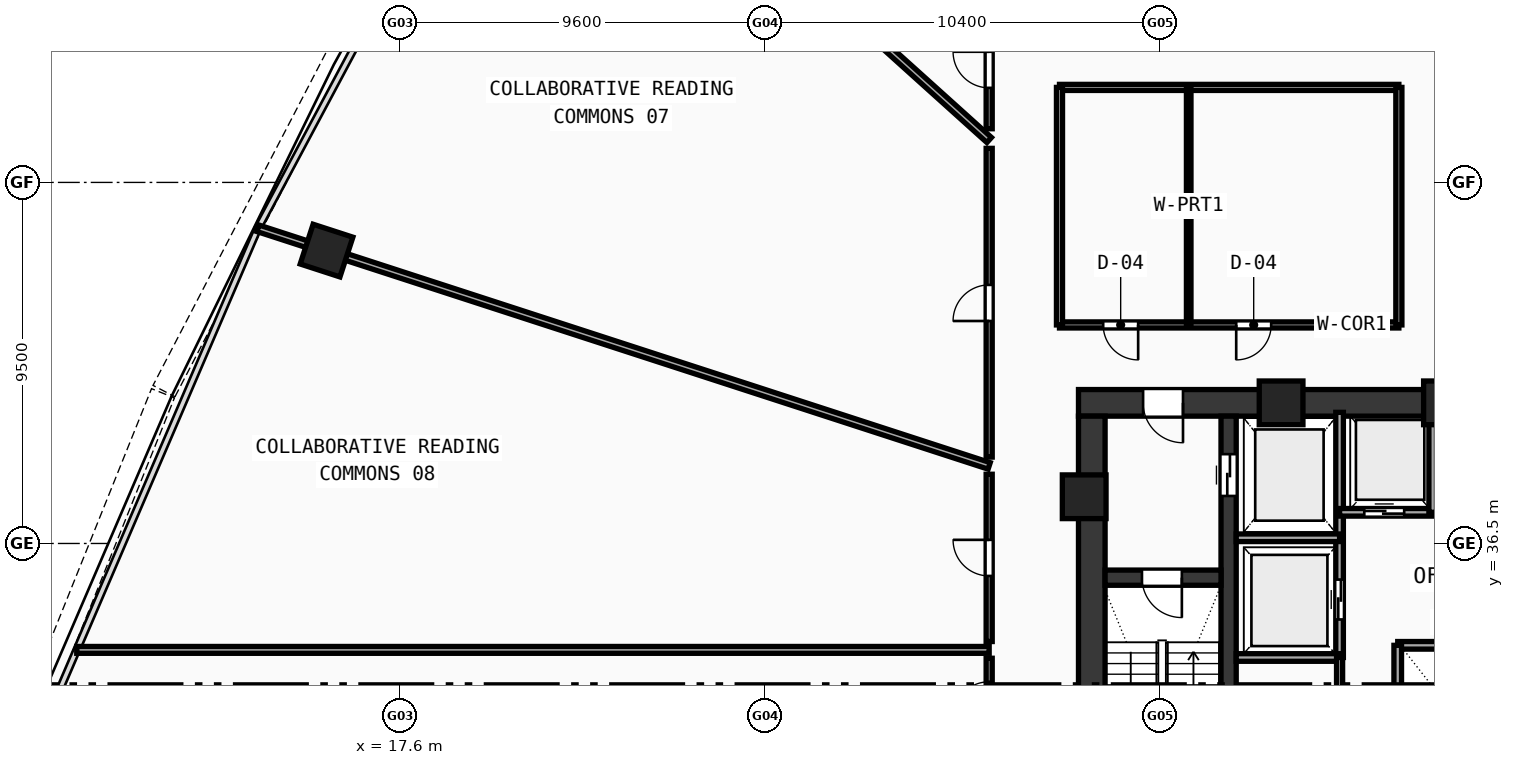
"""IFC4 building model, lengths in metres.
Left out: names, types, materials, properties, quantities, classifications, styles, units other than length and angle.
Written with IfcOpenShell. Run it as: python <this file> out.ifc"""

import sys

from ifc_helpers import new_model, si_unit, direction, frame, frame_2d, origin, origin_with_axes, origin_2d, place, context, subcontext, project, spatial, rectangle, hollow_rectangle, extrude, source, transform, mapped, element, fill, save


model = new_model("IFC4")
c1 = context("Model", 3, precision=1e-05, world=origin(), true_north=direction((0.0, 1.0)))
c2 = subcontext(c1, "Body", "Model", "MODEL_VIEW")
j1 = project(units=[si_unit("LENGTHUNIT", "METRE"), si_unit("PLANEANGLEUNIT", "RADIAN")], contexts=[c1])
p1 = place(None, origin())
s1 = spatial("IfcSite", under=j1, at=p1, CompositionType="ELEMENT")
p2 = place(p1, origin())
s2 = spatial("IfcBuilding", under=s1, at=p2, CompositionType="ELEMENT")
p3 = place(p2, frame((0.0, 0.0, 34.03)))
s3 = spatial("IfcBuildingStorey", under=s2, at=p3, CompositionType="ELEMENT", Elevation=34.03)
p4 = place(p3, frame((35.45, 40.2, 0.0), z_axis=(0.0, 0.0, 1.0), x_axis=(1.0, 0.0, 0.0)))
e1 = element("IfcWall", 1, at=p4, inside=s3, PredefinedType="SHEAR", context=c2, shape_type="SweptSolid", body=[
    extrude(rectangle(XDim=11.35, YDim=0.7, at=frame_2d((5.675, 0.0))), origin(), (0.0, 0.0, 1.0), 3.37),
])
p5 = place(p4, frame((1.7, 0.0, 0.0)))
e2 = element("IfcOpeningElement", 2, at=p5, cuts=e1, PredefinedType="OPENING", context=c2, shape_type="SweptSolid", body=[
    extrude(rectangle(XDim=1.05, YDim=2.1, at=frame_2d((0.525, 1.05))), frame((0.0, 0.36, 0.0), z_axis=(0.0, -1.0, 0.0), x_axis=(1.0, 0.0, 0.0)), (0.0, 0.0, 1.0), 0.72),
])
p6 = place(p3, frame((35.8, 27.85, 0.0), z_axis=(0.0, 0.0, 1.0), x_axis=(0.0, 1.0, 0.0)))
e3 = element("IfcWall", 3, at=p6, inside=s3, PredefinedType="SHEAR", context=c2, shape_type="SweptSolid", body=[
    extrude(rectangle(XDim=12.0, YDim=0.7, at=frame_2d((6.0, 0.0))), origin(), (0.0, 0.0, 1.0), 3.37),
])
p7 = place(p3, frame((39.4, 27.85, 0.0), z_axis=(0.0, 0.0, 1.0), x_axis=(0.0, 1.0, 0.0)))
e4 = element("IfcWall", 4, at=p7, inside=s3, PredefinedType="SHEAR", context=c2, shape_type="SweptSolid", body=[
    extrude(rectangle(XDim=12.0, YDim=0.4, at=frame_2d((6.0, 0.0))), origin(), (0.0, 0.0, 1.0), 3.37),
])
p8 = place(p7, frame((9.9, 0.0, 0.0)))
e5 = element("IfcOpeningElement", 5, at=p8, cuts=e4, PredefinedType="OPENING", context=c2, shape_type="SweptSolid", body=[
    extrude(rectangle(XDim=1.1, YDim=2.1, at=frame_2d((0.55, 1.05))), frame((0.0, 0.21, 0.0), z_axis=(0.0, -1.0, 0.0), x_axis=(1.0, 0.0, 0.0)), (0.0, 0.0, 1.0), 0.42),
])
p9 = place(p3, frame((36.15, 35.6, 0.0), z_axis=(0.0, 0.0, 1.0), x_axis=(1.0, 0.0, 0.0)))
e6 = element("IfcWall", 6, at=p9, inside=s3, PredefinedType="SHEAR", context=c2, shape_type="SweptSolid", body=[
    extrude(rectangle(XDim=3.05, YDim=0.4, at=frame_2d((1.525, 0.0))), origin(), (0.0, 0.0, 1.0), 3.37),
])
p10 = place(p9, frame((0.97, 0.0, 0.0)))
e7 = element("IfcOpeningElement", 7, at=p10, cuts=e6, PredefinedType="OPENING", context=c2, shape_type="SweptSolid", body=[
    extrude(rectangle(XDim=1.05, YDim=2.1, at=frame_2d((0.525, 1.05))), frame((0.0, 0.21, 0.0), z_axis=(0.0, -1.0, 0.0), x_axis=(1.0, 0.0, 0.0)), (0.0, 0.0, 1.0), 0.42),
])
m1 = source(origin(), c2, "Body", "SweptSolid", [
    extrude(hollow_rectangle(XDim=1.15, YDim=1.15, WallThickness=0.048, at=origin_2d()), origin(), (0.0, 0.0, 1.0), 3.63),
])
for number, where, z_axis, x_axis in (
    (8, (45.106, 40.2, -0.26), (0.0, 0.0, 1.0), (1.0, 0.0, 0.0)),
    (9, (40.781, 40.2, -0.26), (0.0, 0.0, 1.0), (1.0, 0.0, 0.0)),
    (10, (35.6, 37.729, -0.26), (0.0, 0.0, 1.0), (1.0, 0.0, 0.0)),
):
    element("IfcColumn", number, at=place(p3, frame(where, z_axis=z_axis, x_axis=x_axis)), inside=s3, PredefinedType="COLUMN", context=c2, shape_type="MappedRepresentation", body=[
        mapped(m1, transform((0.0, 0.0, 0.0), scale=1.0)),
    ])
m2 = source(origin(), c2, "Body", "SweptSolid", [
    extrude(hollow_rectangle(XDim=1.1, YDim=1.1, WallThickness=0.045, at=origin_2d()), origin(), (0.0, 0.0, 1.0), 3.63),
])
p11 = place(p3, frame((15.665, 44.206, -0.26), z_axis=(0.0, 0.0, 1.0), x_axis=(-0.309016994375, -0.951056516295, 0.0)))
e11 = element("IfcColumn", 11, at=p11, inside=s3, PredefinedType="COLUMN", context=c2, shape_type="MappedRepresentation", body=[
    mapped(m2, transform((0.0, 0.0, 0.0), scale=1.0)),
])
p12 = place(p3, frame((42.32, 33.5, 0.0), z_axis=(0.0, 0.0, 1.0), x_axis=(0.0, 1.0, 0.0)))
e12 = element("IfcWall", 12, at=p12, inside=s3, PredefinedType="SOLIDWALL", context=c2, shape_type="SweptSolid", body=[
    extrude(rectangle(XDim=6.45, YDim=0.2, at=frame_2d((3.225, 0.0))), origin(), (0.0, 0.0, 1.0), 3.37),
])
p13 = place(p12, frame((1.0, 0.0, 0.0)))
e13 = element("IfcOpeningElement", 13, at=p13, cuts=e12, PredefinedType="OPENING", context=c2, shape_type="SweptSolid", body=[
    extrude(rectangle(XDim=1.05, YDim=2.1, at=frame_2d((0.525, 1.05))), frame((0.0, 0.11, 0.0), z_axis=(0.0, -1.0, 0.0), x_axis=(1.0, 0.0, 0.0)), (0.0, 0.0, 1.0), 0.22),
])
for number, where, z_axis, x_axis in (
    (14, (39.6, 36.65, 0.0), (0.0, 0.0, 1.0), (1.0, 0.0, 0.0)),
    (15, (39.6, 33.5, 0.0), (0.0, 0.0, 1.0), (1.0, 0.0, 0.0)),
):
    element("IfcWall", number, at=place(p3, frame(where, z_axis=z_axis, x_axis=x_axis)), inside=s3, PredefinedType="SOLIDWALL", context=c2, shape_type="SweptSolid", body=[
        extrude(rectangle(XDim=2.72, YDim=0.2, at=frame_2d((1.36, 0.0))), origin(), (0.0, 0.0, 1.0), 3.37),
    ])
p14 = place(p3, frame((42.32, 37.32, 0.0), z_axis=(0.0, 0.0, 1.0), x_axis=(1.0, 0.0, 0.0)))
e16 = element("IfcWall", 16, at=p14, inside=s3, PredefinedType="SOLIDWALL", context=c2, shape_type="SweptSolid", body=[
    extrude(rectangle(XDim=4.73, YDim=0.2, at=frame_2d((2.365, 0.0))), origin(), (0.0, 0.0, 1.0), 3.37),
])
p15 = place(p14, frame((0.65, 0.0, 0.0)))
e17 = element("IfcOpeningElement", 17, at=p15, cuts=e16, PredefinedType="OPENING", context=c2, shape_type="SweptSolid", body=[
    extrude(rectangle(XDim=1.05, YDim=2.1, at=frame_2d((0.525, 1.05))), frame((0.0, 0.11, 0.0), z_axis=(0.0, -1.0, 0.0), x_axis=(1.0, 0.0, 0.0)), (0.0, 0.0, 1.0), 0.22),
])
p16 = place(p14, frame((2.95, 0.0, 0.0)))
e18 = element("IfcOpeningElement", 18, at=p16, cuts=e16, PredefinedType="OPENING", context=c2, shape_type="SweptSolid", body=[
    extrude(rectangle(XDim=1.05, YDim=2.1, at=frame_2d((0.525, 1.05))), frame((0.0, 0.11, 0.0), z_axis=(0.0, -1.0, 0.0), x_axis=(1.0, 0.0, 0.0)), (0.0, 0.0, 1.0), 0.22),
])
p17 = place(p3, frame((44.77, 37.32, 0.0), z_axis=(0.0, 0.0, 1.0), x_axis=(0.0, 1.0, 0.0)))
e19 = element("IfcWall", 19, at=p17, inside=s3, PredefinedType="SOLIDWALL", context=c2, shape_type="SweptSolid", body=[
    extrude(rectangle(XDim=2.63, YDim=0.2, at=frame_2d((1.315, 0.0))), origin(), (0.0, 0.0, 1.0), 3.37),
])
p18 = place(p3, frame((43.85, 33.82, 0.0), z_axis=(0.0, 0.0, 1.0), x_axis=(1.0, 0.0, 0.0)))
e20 = element("IfcWall", 20, at=p18, inside=s3, PredefinedType="SOLIDWALL", context=c2, shape_type="SweptSolid", body=[
    extrude(rectangle(XDim=9.83, YDim=0.2, at=frame_2d((4.915, 0.0))), origin(), (0.0, 0.0, 1.0), 3.37),
])
p19 = place(p3, frame((43.85, 27.6, 0.0), z_axis=(0.0, 0.0, 1.0), x_axis=(0.0, 1.0, 0.0)))
e21 = element("IfcWall", 21, at=p19, inside=s3, PredefinedType="SOLIDWALL", context=c2, shape_type="SweptSolid", body=[
    extrude(rectangle(XDim=6.22, YDim=0.2, at=frame_2d((3.11, 0.0))), origin(), (0.0, 0.0, 1.0), 3.37),
])
p20 = place(p19, frame((2.25, 0.0, 0.0)))
e22 = element("IfcOpeningElement", 22, at=p20, cuts=e21, PredefinedType="OPENING", context=c2, shape_type="SweptSolid", body=[
    extrude(rectangle(XDim=1.05, YDim=2.1, at=frame_2d((0.525, 1.05))), frame((0.0, 0.11, 0.0), z_axis=(0.0, -1.0, 0.0), x_axis=(1.0, 0.0, 0.0)), (0.0, 0.0, 1.0), 0.22),
])
p21 = place(p3, frame((42.32, 27.6, 0.0), z_axis=(0.0, 0.0, 1.0), x_axis=(0.0, 1.0, 0.0)))
e23 = element("IfcWall", 23, at=p21, inside=s3, PredefinedType="PARTITIONING", context=c2, shape_type="SweptSolid", body=[
    extrude(rectangle(XDim=5.9, YDim=0.16, at=frame_2d((2.95, 0.0))), origin(), (0.0, 0.0, 1.0), 3.37),
])
p22 = place(p21, frame((3.2, 0.0, 0.0)))
e24 = element("IfcOpeningElement", 24, at=p22, cuts=e23, PredefinedType="OPENING", context=c2, shape_type="SweptSolid", body=[
    extrude(rectangle(XDim=0.94, YDim=2.1, at=frame_2d((0.47, 1.05))), frame((0.0, 0.09, 0.0), z_axis=(0.0, -1.0, 0.0), x_axis=(1.0, 0.0, 0.0)), (0.0, 0.0, 1.0), 0.18),
])
p23 = place(p3, frame((34.95, 42.25, 0.0), z_axis=(0.0, 0.0, 1.0), x_axis=(1.0, 0.0, 0.0)))
e25 = element("IfcWall", 25, at=p23, inside=s3, PredefinedType="PARTITIONING", context=c2, shape_type="SweptSolid", body=[
    extrude(rectangle(XDim=8.93, YDim=0.16, at=frame_2d((4.465, 0.0))), origin(), (0.0, 0.0, 1.0), 2.67),
])
p24 = place(p23, frame((1.15, 0.0, 0.0)))
e26 = element("IfcOpeningElement", 26, at=p24, cuts=e25, PredefinedType="OPENING", context=c2, shape_type="SweptSolid", body=[
    extrude(rectangle(XDim=0.92, YDim=2.1, at=frame_2d((0.46, 1.05))), frame((0.0, 0.09, 0.0), z_axis=(0.0, -1.0, 0.0), x_axis=(1.0, 0.0, 0.0)), (0.0, 0.0, 1.0), 0.18),
])
p25 = place(p23, frame((4.65, 0.0, 0.0)))
e27 = element("IfcOpeningElement", 27, at=p25, cuts=e25, PredefinedType="OPENING", context=c2, shape_type="SweptSolid", body=[
    extrude(rectangle(XDim=0.92, YDim=2.1, at=frame_2d((0.46, 1.05))), frame((0.0, 0.09, 0.0), z_axis=(0.0, -1.0, 0.0), x_axis=(1.0, 0.0, 0.0)), (0.0, 0.0, 1.0), 0.18),
])
p26 = place(p3, frame((34.95, 48.5, 0.0), z_axis=(0.0, 0.0, 1.0), x_axis=(1.0, 0.0, 0.0)))
e28 = element("IfcWall", 28, at=p26, inside=s3, PredefinedType="PARTITIONING", context=c2, shape_type="SweptSolid", body=[
    extrude(rectangle(XDim=8.93, YDim=0.16, at=frame_2d((4.465, 0.0))), origin(), (0.0, 0.0, 1.0), 2.67),
])
for number, where, z_axis, x_axis in (
    (29, (34.95, 42.25, 0.0), (0.0, 0.0, 1.0), (0.0, 1.0, 0.0)),
    (30, (43.88, 42.25, 0.0), (0.0, 0.0, 1.0), (0.0, 1.0, 0.0)),
):
    element("IfcWall", number, at=place(p3, frame(where, z_axis=z_axis, x_axis=x_axis)), inside=s3, PredefinedType="PARTITIONING", context=c2, shape_type="SweptSolid", body=[
        extrude(rectangle(XDim=6.25, YDim=0.16, at=frame_2d((3.125, 0.0))), origin(), (0.0, 0.0, 1.0), 2.67),
    ])
p27 = place(p3, frame((38.35, 42.25, 0.0), z_axis=(0.0, 0.0, 1.0), x_axis=(0.0, 1.0, 0.0)))
e31 = element("IfcWall", 31, at=p27, inside=s3, PredefinedType="PARTITIONING", context=c2, shape_type="SweptSolid", body=[
    extrude(rectangle(XDim=6.25, YDim=0.12, at=frame_2d((3.125, 0.0))), origin(), (0.0, 0.0, 1.0), 2.67),
])
p28 = place(p3, frame((33.1, 47.116, 0.0), z_axis=(0.0, 0.0, 1.0), x_axis=(-0.74314347906, 0.669132101704, 0.0)))
e32 = element("IfcWall", 32, at=p28, inside=s3, PredefinedType="PARTITIONING", context=c2, shape_type="SweptSolid", body=[
    extrude(rectangle(XDim=16.358, YDim=0.18, at=frame_2d((8.179, 0.0))), origin(), (0.0, 0.0, 1.0), 2.67),
])
p29 = place(p3, frame((33.1, 38.541, 0.0), z_axis=(0.0, 0.0, 1.0), x_axis=(-0.951056237035, 0.309017853848, 0.0)))
e33 = element("IfcWall", 33, at=p29, inside=s3, PredefinedType="PARTITIONING", context=c2, shape_type="SweptSolid", body=[
    extrude(rectangle(XDim=20.231, YDim=0.18, at=frame_2d((10.115, 0.0))), origin(), (0.0, 0.0, 1.0), 2.67),
])
p30 = place(p3, frame((33.1, 33.7, 0.0), z_axis=(0.0, 0.0, 1.0), x_axis=(-1.0, 0.0, 0.0)))
e34 = element("IfcWall", 34, at=p30, inside=s3, PredefinedType="PARTITIONING", context=c2, shape_type="SweptSolid", body=[
    extrude(rectangle(XDim=24.008, YDim=0.18, at=frame_2d((12.004, 0.0))), origin(), (0.0, 0.0, 1.0), 2.67),
])
p31 = place(p3, frame((33.1, 31.292, 0.0), z_axis=(0.0, 0.0, 1.0), x_axis=(0.0, 1.0, 0.0)))
e35 = element("IfcWall", 35, at=p31, inside=s3, PredefinedType="PARTITIONING", context=c2, shape_type="SweptSolid", body=[
    extrude(rectangle(XDim=2.188, YDim=0.16, at=frame_2d((1.094, 0.0))), origin(), (0.0, 0.0, 1.0), 3.37),
])
p32 = place(p31, frame((0.619, 0.0, 0.0)))
e36 = element("IfcOpeningElement", 36, at=p32, cuts=e35, PredefinedType="OPENING", context=c2, shape_type="SweptSolid", body=[
    extrude(rectangle(XDim=0.95, YDim=2.1, at=frame_2d((0.475, 1.05))), frame((0.0, 0.09, 0.0), z_axis=(0.0, -1.0, 0.0), x_axis=(1.0, 0.0, 0.0)), (0.0, 0.0, 1.0), 0.18),
])
p33 = place(p3, frame((33.1, 33.92, 0.0), z_axis=(0.0, 0.0, 1.0), x_axis=(0.0, 1.0, 0.0)))
e37 = element("IfcWall", 37, at=p33, inside=s3, PredefinedType="PARTITIONING", context=c2, shape_type="SweptSolid", body=[
    extrude(rectangle(XDim=4.402, YDim=0.16, at=frame_2d((2.201, 0.0))), origin(), (0.0, 0.0, 1.0), 3.37),
])
p34 = place(p33, frame((1.726, 0.0, 0.0)))
e38 = element("IfcOpeningElement", 38, at=p34, cuts=e37, PredefinedType="OPENING", context=c2, shape_type="SweptSolid", body=[
    extrude(rectangle(XDim=0.95, YDim=2.1, at=frame_2d((0.475, 1.05))), frame((0.0, 0.09, 0.0), z_axis=(0.0, -1.0, 0.0), x_axis=(1.0, 0.0, 0.0)), (0.0, 0.0, 1.0), 0.18),
])
p35 = place(p3, frame((33.1, 38.773, 0.0), z_axis=(0.0, 0.0, 1.0), x_axis=(0.0, 1.0, 0.0)))
e39 = element("IfcWall", 39, at=p35, inside=s3, PredefinedType="PARTITIONING", context=c2, shape_type="SweptSolid", body=[
    extrude(rectangle(XDim=8.124, YDim=0.16, at=frame_2d((4.062, 0.0))), origin(), (0.0, 0.0, 1.0), 2.67),
])
p36 = place(p35, frame((3.581, 0.0, 0.0)))
e40 = element("IfcOpeningElement", 40, at=p36, cuts=e39, PredefinedType="OPENING", context=c2, shape_type="SweptSolid", body=[
    extrude(rectangle(XDim=0.95, YDim=2.1, at=frame_2d((0.475, 1.05))), frame((0.0, 0.09, 0.0), z_axis=(0.0, -1.0, 0.0), x_axis=(1.0, 0.0, 0.0)), (0.0, 0.0, 1.0), 0.18),
])
p37 = place(p3, frame((33.1, 47.412, 0.0), z_axis=(0.0, 0.0, 1.0), x_axis=(0.0, 1.0, 0.0)))
e41 = element("IfcWall", 41, at=p37, inside=s3, PredefinedType="PARTITIONING", context=c2, shape_type="SweptSolid", body=[
    extrude(rectangle(XDim=2.938, YDim=0.16, at=frame_2d((1.469, 0.0))), origin(), (0.0, 0.0, 1.0), 3.37),
])
p38 = place(p37, frame((1.076, 0.0, 0.0)))
e42 = element("IfcOpeningElement", 42, at=p38, cuts=e41, PredefinedType="OPENING", context=c2, shape_type="SweptSolid", body=[
    extrude(rectangle(XDim=0.95, YDim=2.1, at=frame_2d((0.475, 1.05))), frame((0.0, 0.09, 0.0), z_axis=(0.0, -1.0, 0.0), x_axis=(1.0, 0.0, 0.0)), (0.0, 0.0, 1.0), 0.18),
])
m3 = source(origin(), c2, "Body", "SweptSolid", [
    extrude(rectangle(XDim=1.05, YDim=2.1, at=frame_2d((0.525, 1.05))), frame((0.0, 0.025, 0.0), z_axis=(0.0, -1.0, 0.0), x_axis=(1.0, 0.0, 0.0)), (0.0, 0.0, 1.0), 0.05),
])
p39 = place(p10, frame((1.05, 0.0, 0.0), z_axis=(0.0, 0.0, 1.0), x_axis=(-1.0, 0.0, 0.0)))
e43 = element("IfcDoor", 43, at=p39, inside=s3, OperationType="SINGLE_SWING_LEFT", PredefinedType="DOOR", context=c2, shape_type="MappedRepresentation", body=[
    mapped(m3, transform((0.0, 0.0, 0.0), scale=1.0)),
])
fill(e7, e43)
p40 = place(p5, frame((1.05, 0.0, 0.0), z_axis=(0.0, 0.0, 1.0), x_axis=(-1.0, 0.0, 0.0)))
e44 = element("IfcDoor", 44, at=p40, inside=s3, OperationType="SINGLE_SWING_LEFT", PredefinedType="DOOR", context=c2, shape_type="MappedRepresentation", body=[
    mapped(m3, transform((0.0, 0.0, 0.0), scale=1.0)),
])
fill(e2, e44)
m4 = source(origin(), c2, "Body", "SweptSolid", [
    extrude(rectangle(XDim=1.1, YDim=2.1, at=frame_2d((0.55, 1.05))), frame((0.0, 0.025, 0.0), z_axis=(0.0, -1.0, 0.0), x_axis=(1.0, 0.0, 0.0)), (0.0, 0.0, 1.0), 0.05),
])
p41 = place(p8, frame((1.1, 0.0, 0.0), z_axis=(0.0, 0.0, 1.0), x_axis=(-1.0, 0.0, 0.0)))
e45 = element("IfcDoor", 45, at=p41, inside=s3, OperationType="DOUBLE_DOOR_SLIDING", PredefinedType="DOOR", context=c2, shape_type="MappedRepresentation", body=[
    mapped(m4, transform((0.0, 0.0, 0.0), scale=1.0)),
])
fill(e5, e45)
p42 = place(p13, origin_with_axes())
e46 = element("IfcDoor", 46, at=p42, inside=s3, OperationType="DOUBLE_DOOR_SLIDING", PredefinedType="DOOR", context=c2, shape_type="MappedRepresentation", body=[
    mapped(m3, transform((0.0, 0.0, 0.0), scale=1.0)),
])
fill(e13, e46)
p43 = place(p15, frame((1.05, 0.0, 0.0), z_axis=(0.0, 0.0, 1.0), x_axis=(-1.0, 0.0, 0.0)))
e47 = element("IfcDoor", 47, at=p43, inside=s3, OperationType="DOUBLE_DOOR_SLIDING", PredefinedType="DOOR", context=c2, shape_type="MappedRepresentation", body=[
    mapped(m3, transform((0.0, 0.0, 0.0), scale=1.0)),
])
fill(e17, e47)
m5 = source(origin(), c2, "Body", "SweptSolid", [
    extrude(rectangle(XDim=0.92, YDim=2.1, at=frame_2d((0.46, 1.05))), frame((0.0, 0.025, 0.0), z_axis=(0.0, -1.0, 0.0), x_axis=(1.0, 0.0, 0.0)), (0.0, 0.0, 1.0), 0.05),
])
p44 = place(p24, frame((0.92, 0.0, 0.0), z_axis=(0.0, 0.0, 1.0), x_axis=(-1.0, 0.0, 0.0)))
e48 = element("IfcDoor", 48, at=p44, inside=s3, OperationType="SINGLE_SWING_LEFT", PredefinedType="DOOR", context=c2, shape_type="MappedRepresentation", body=[
    mapped(m5, transform((0.0, 0.0, 0.0), scale=1.0)),
])
fill(e26, e48)
p45 = place(p25, frame((0.92, 0.0, 0.0), z_axis=(0.0, 0.0, 1.0), x_axis=(-1.0, 0.0, 0.0)))
e49 = element("IfcDoor", 49, at=p45, inside=s3, OperationType="SINGLE_SWING_RIGHT", PredefinedType="DOOR", context=c2, shape_type="MappedRepresentation", body=[
    mapped(m5, transform((0.0, 0.0, 0.0), scale=1.0)),
])
fill(e27, e49)
m6 = source(origin(), c2, "Body", "SweptSolid", [
    extrude(rectangle(XDim=0.95, YDim=2.1, at=frame_2d((0.475, 1.05))), frame((0.0, 0.025, 0.0), z_axis=(0.0, -1.0, 0.0), x_axis=(1.0, 0.0, 0.0)), (0.0, 0.0, 1.0), 0.05),
])
p46 = place(p38, origin_with_axes())
e50 = element("IfcDoor", 50, at=p46, inside=s3, OperationType="SINGLE_SWING_RIGHT", PredefinedType="DOOR", context=c2, shape_type="MappedRepresentation", body=[
    mapped(m6, transform((0.0, 0.0, 0.0), scale=1.0)),
])
fill(e42, e50)
p47 = place(p36, origin_with_axes())
e51 = element("IfcDoor", 51, at=p47, inside=s3, OperationType="SINGLE_SWING_LEFT", PredefinedType="DOOR", context=c2, shape_type="MappedRepresentation", body=[
    mapped(m6, transform((0.0, 0.0, 0.0), scale=1.0)),
])
fill(e40, e51)
p48 = place(p34, origin_with_axes())
e52 = element("IfcDoor", 52, at=p48, inside=s3, OperationType="SINGLE_SWING_RIGHT", PredefinedType="DOOR", context=c2, shape_type="MappedRepresentation", body=[
    mapped(m6, transform((0.0, 0.0, 0.0), scale=1.0)),
])
fill(e38, e52)
p49 = place(p32, origin_with_axes())
e53 = element("IfcDoor", 53, at=p49, inside=s3, OperationType="SINGLE_SWING_LEFT", PredefinedType="DOOR", context=c2, shape_type="MappedRepresentation", body=[
    mapped(m6, transform((0.0, 0.0, 0.0), scale=1.0)),
])
fill(e36, e53)
save(model, sys.argv[1])
